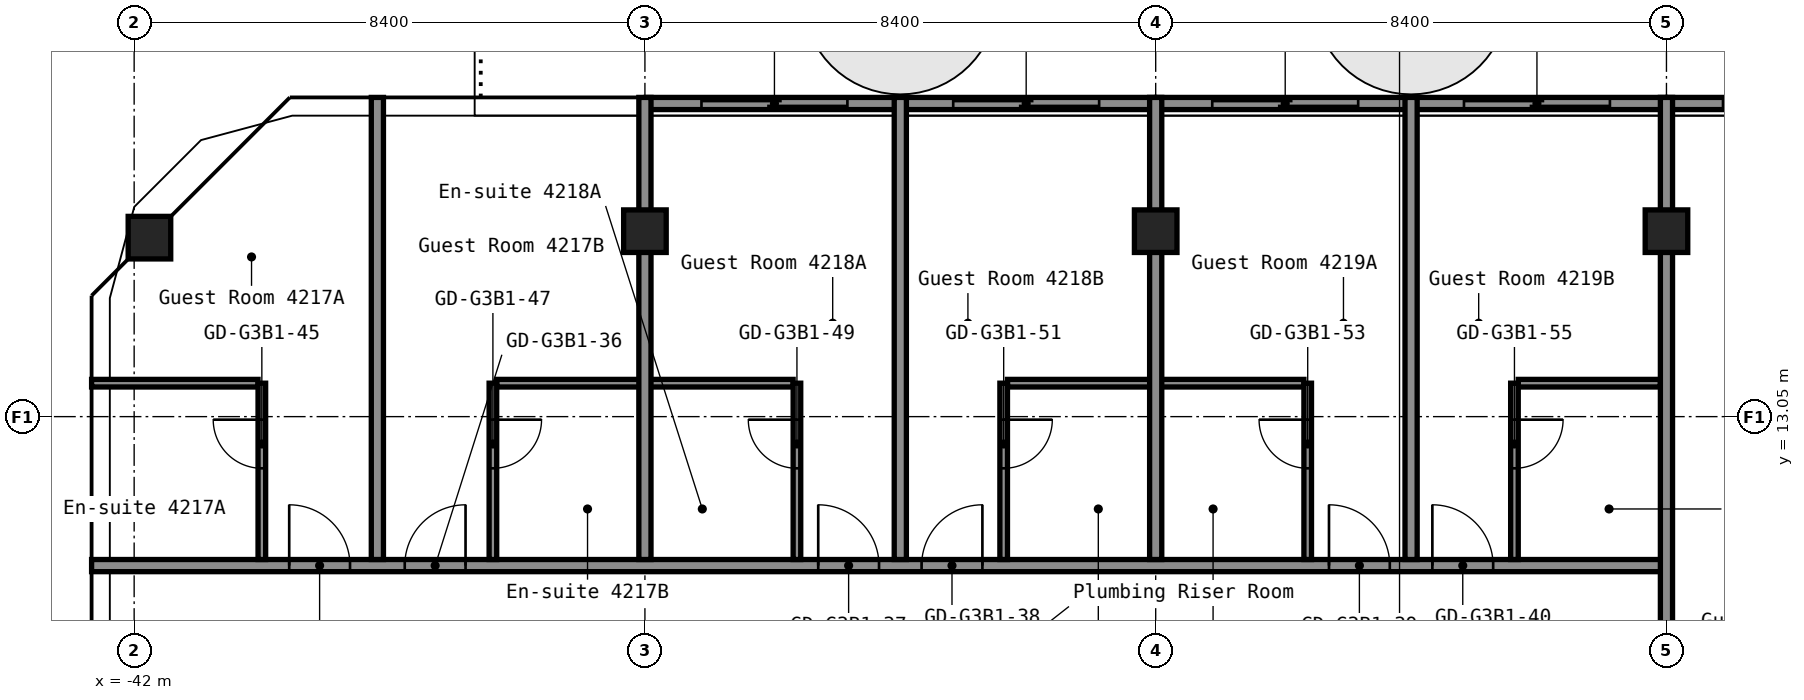
"""IFC4 building model, lengths in metres.
Left out: names, types, materials, properties, quantities, classifications, styles, units other than length and angle.
Written with IfcOpenShell. Run it as: python <this file> out.ifc"""

import sys

from ifc_helpers import new_model, si_unit, direction, frame, frame_2d, origin, origin_2d, place, context, subcontext, project, spatial, rectangle, hollow_rectangle, extrude, element, fill, save


model = new_model("IFC4")
c1 = context("Model", 3, precision=1e-05, world=origin(), true_north=direction((0.0, 1.0)))
c2 = subcontext(c1, "Body", "Model", "MODEL_VIEW")
j1 = project(units=[si_unit("LENGTHUNIT", "METRE"), si_unit("PLANEANGLEUNIT", "RADIAN")], contexts=[c1])
p1 = place(None, origin())
s1 = spatial("IfcSite", under=j1, at=p1, CompositionType="ELEMENT")
p2 = place(p1, origin())
s2 = spatial("IfcBuilding", under=s1, at=p2, CompositionType="ELEMENT")
p3 = place(p2, frame((0.0, 0.0, 150.2)))
s3 = spatial("IfcBuildingStorey", under=s2, at=p3, CompositionType="ELEMENT", Elevation=150.2)
for number, where, z_axis, x_axis in (
    (1, (-41.749, 15.994, 0.0), (0.0, 0.0, 1.0), (1.0, 0.0, 0.0)),
    (2, (-33.6, 16.1, 0.0), (0.0, 0.0, 1.0), (1.0, 0.0, 0.0)),
    (3, (-25.2, 16.1, 0.0), (0.0, 0.0, 1.0), (1.0, 0.0, 0.0)),
    (4, (-16.8, 16.1, 0.0), (0.0, 0.0, 1.0), (1.0, 0.0, 0.0)),
):
    element("IfcColumn", number, at=place(p3, frame(where, z_axis=z_axis, x_axis=x_axis)), inside=s3, PredefinedType="COLUMN", context=c2, shape_type="SweptSolid", body=[
        extrude(hollow_rectangle(XDim=0.7, YDim=0.7, WallThickness=0.028, at=origin_2d()), origin(), (0.0, 0.0, 1.0), 2.75),
    ])
p4 = place(p3, frame((-42.7, 10.6, 0.0), z_axis=(0.0, 0.0, 1.0), x_axis=(1.0, 0.0, 0.0)))
e5 = element("IfcWall", 5, at=p4, inside=s3, PredefinedType="PARTITIONING", context=c2, shape_type="SweptSolid", body=[
    extrude(rectangle(XDim=25.9, YDim=0.2, at=frame_2d((12.95, 0.0))), origin(), (0.0, 0.0, 1.0), 2.75),
])
p5 = place(p4, frame((3.25, 0.0, 0.0)))
e6 = element("IfcOpeningElement", 6, at=p5, cuts=e5, PredefinedType="OPENING", context=c2, shape_type="SweptSolid", body=[
    extrude(rectangle(XDim=1.0, YDim=2.1, at=frame_2d((0.5, 1.05))), frame((0.0, 0.11, 0.0), z_axis=(0.0, -1.0, 0.0), x_axis=(1.0, 0.0, 0.0)), (0.0, 0.0, 1.0), 0.22),
])
p6 = place(p4, frame((5.15, 0.0, 0.0)))
e7 = element("IfcOpeningElement", 7, at=p6, cuts=e5, PredefinedType="OPENING", context=c2, shape_type="SweptSolid", body=[
    extrude(rectangle(XDim=1.0, YDim=2.1, at=frame_2d((0.5, 1.05))), frame((0.0, 0.11, 0.0), z_axis=(0.0, -1.0, 0.0), x_axis=(1.0, 0.0, 0.0)), (0.0, 0.0, 1.0), 0.22),
])
p7 = place(p4, frame((11.95, 0.0, 0.0)))
e8 = element("IfcOpeningElement", 8, at=p7, cuts=e5, PredefinedType="OPENING", context=c2, shape_type="SweptSolid", body=[
    extrude(rectangle(XDim=1.0, YDim=2.1, at=frame_2d((0.5, 1.05))), frame((0.0, 0.11, 0.0), z_axis=(0.0, -1.0, 0.0), x_axis=(1.0, 0.0, 0.0)), (0.0, 0.0, 1.0), 0.22),
])
p8 = place(p4, frame((13.65, 0.0, 0.0)))
e9 = element("IfcOpeningElement", 9, at=p8, cuts=e5, PredefinedType="OPENING", context=c2, shape_type="SweptSolid", body=[
    extrude(rectangle(XDim=1.0, YDim=2.1, at=frame_2d((0.5, 1.05))), frame((0.0, 0.11, 0.0), z_axis=(0.0, -1.0, 0.0), x_axis=(1.0, 0.0, 0.0)), (0.0, 0.0, 1.0), 0.22),
])
p9 = place(p4, frame((20.35, 0.0, 0.0)))
e10 = element("IfcOpeningElement", 10, at=p9, cuts=e5, PredefinedType="OPENING", context=c2, shape_type="SweptSolid", body=[
    extrude(rectangle(XDim=1.0, YDim=2.1, at=frame_2d((0.5, 1.05))), frame((0.0, 0.11, 0.0), z_axis=(0.0, -1.0, 0.0), x_axis=(1.0, 0.0, 0.0)), (0.0, 0.0, 1.0), 0.22),
])
p10 = place(p4, frame((22.05, 0.0, 0.0)))
e11 = element("IfcOpeningElement", 11, at=p10, cuts=e5, PredefinedType="OPENING", context=c2, shape_type="SweptSolid", body=[
    extrude(rectangle(XDim=1.0, YDim=2.1, at=frame_2d((0.5, 1.05))), frame((0.0, 0.11, 0.0), z_axis=(0.0, -1.0, 0.0), x_axis=(1.0, 0.0, 0.0)), (0.0, 0.0, 1.0), 0.22),
])
p11 = place(p3, frame((-42.7, 13.6, 0.0), z_axis=(0.0, 0.0, 1.0), x_axis=(1.0, 0.0, 0.0)))
e12 = element("IfcWall", 12, at=p11, inside=s3, PredefinedType="PARTITIONING", context=c2, shape_type="SweptSolid", body=[
    extrude(rectangle(XDim=2.738, YDim=0.125, at=frame_2d((1.369, 0.0))), origin(), (0.0, 0.0, 1.0), 2.75),
])
for number, where, z_axis, x_axis in (
    (13, (-36.038, 13.6, 0.0), (0.0, 0.0, 1.0), (1.0, 0.0, 0.0)),
    (14, (-27.637, 13.6, 0.0), (0.0, 0.0, 1.0), (1.0, 0.0, 0.0)),
):
    element("IfcWall", number, at=place(p3, frame(where, z_axis=z_axis, x_axis=x_axis)), inside=s3, PredefinedType="PARTITIONING", context=c2, shape_type="SweptSolid", body=[
        extrude(rectangle(XDim=4.875, YDim=0.125, at=frame_2d((2.438, 0.0))), origin(), (0.0, 0.0, 1.0), 2.75),
    ])
p12 = place(p3, frame((-19.238, 13.6, 0.0), z_axis=(0.0, 0.0, 1.0), x_axis=(1.0, 0.0, 0.0)))
e15 = element("IfcWall", 15, at=p12, inside=s3, PredefinedType="PARTITIONING", context=c2, shape_type="SweptSolid", body=[
    extrude(rectangle(XDim=2.338, YDim=0.125, at=frame_2d((1.169, 0.0))), origin(), (0.0, 0.0, 1.0), 2.75),
])
p13 = place(p3, frame((-39.9, 10.7, 0.0), z_axis=(0.0, 0.0, 1.0), x_axis=(0.0, 1.0, 0.0)))
e16 = element("IfcWall", 16, at=p13, inside=s3, PredefinedType="PARTITIONING", context=c2, shape_type="SweptSolid", body=[
    extrude(rectangle(XDim=2.9, YDim=0.125, at=frame_2d((1.45, 0.0))), origin(), (0.0, 0.0, 1.0), 2.75),
])
p14 = place(p13, frame((1.5, 0.0, 0.0)))
e17 = element("IfcOpeningElement", 17, at=p14, cuts=e16, PredefinedType="OPENING", context=c2, shape_type="SweptSolid", body=[
    extrude(rectangle(XDim=0.8, YDim=2.1, at=frame_2d((0.4, 1.05))), frame((0.0, 0.073, 0.0), z_axis=(0.0, -1.0, 0.0), x_axis=(1.0, 0.0, 0.0)), (0.0, 0.0, 1.0), 0.145),
])
p15 = place(p3, frame((-38.0, 10.7, 0.0), z_axis=(0.0, 0.0, 1.0), x_axis=(0.0, 1.0, 0.0)))
e18 = element("IfcWall", 18, at=p15, inside=s3, PredefinedType="PARTITIONING", context=c2, shape_type="SweptSolid", body=[
    extrude(rectangle(XDim=7.6, YDim=0.2, at=frame_2d((3.8, 0.0))), origin(), (0.0, 0.0, 1.0), 2.75),
])
p16 = place(p3, frame((-36.1, 10.7, 0.0), z_axis=(0.0, 0.0, 1.0), x_axis=(0.0, 1.0, 0.0)))
e19 = element("IfcWall", 19, at=p16, inside=s3, PredefinedType="PARTITIONING", context=c2, shape_type="SweptSolid", body=[
    extrude(rectangle(XDim=2.9, YDim=0.125, at=frame_2d((1.45, 0.0))), origin(), (0.0, 0.0, 1.0), 2.75),
])
p17 = place(p16, frame((1.5, 0.0, 0.0)))
e20 = element("IfcOpeningElement", 20, at=p17, cuts=e19, PredefinedType="OPENING", context=c2, shape_type="SweptSolid", body=[
    extrude(rectangle(XDim=0.8, YDim=2.1, at=frame_2d((0.4, 1.05))), frame((0.0, 0.073, 0.0), z_axis=(0.0, -1.0, 0.0), x_axis=(1.0, 0.0, 0.0)), (0.0, 0.0, 1.0), 0.145),
])
p18 = place(p3, frame((-33.6, 10.7, 0.0), z_axis=(0.0, 0.0, 1.0), x_axis=(0.0, 1.0, 0.0)))
e21 = element("IfcWall", 21, at=p18, inside=s3, PredefinedType="PARTITIONING", context=c2, shape_type="SweptSolid", body=[
    extrude(rectangle(XDim=7.6, YDim=0.2, at=frame_2d((3.8, 0.0))), origin(), (0.0, 0.0, 1.0), 2.75),
])
p19 = place(p3, frame((-31.1, 10.7, 0.0), z_axis=(0.0, 0.0, 1.0), x_axis=(0.0, 1.0, 0.0)))
e22 = element("IfcWall", 22, at=p19, inside=s3, PredefinedType="PARTITIONING", context=c2, shape_type="SweptSolid", body=[
    extrude(rectangle(XDim=2.9, YDim=0.125, at=frame_2d((1.45, 0.0))), origin(), (0.0, 0.0, 1.0), 2.75),
])
p20 = place(p19, frame((1.5, 0.0, 0.0)))
e23 = element("IfcOpeningElement", 23, at=p20, cuts=e22, PredefinedType="OPENING", context=c2, shape_type="SweptSolid", body=[
    extrude(rectangle(XDim=0.8, YDim=2.1, at=frame_2d((0.4, 1.05))), frame((0.0, 0.073, 0.0), z_axis=(0.0, -1.0, 0.0), x_axis=(1.0, 0.0, 0.0)), (0.0, 0.0, 1.0), 0.145),
])
p21 = place(p3, frame((-29.4, 10.7, 0.0), z_axis=(0.0, 0.0, 1.0), x_axis=(0.0, 1.0, 0.0)))
e24 = element("IfcWall", 24, at=p21, inside=s3, PredefinedType="PARTITIONING", context=c2, shape_type="SweptSolid", body=[
    extrude(rectangle(XDim=7.6, YDim=0.2, at=frame_2d((3.8, 0.0))), origin(), (0.0, 0.0, 1.0), 2.75),
])
p22 = place(p3, frame((-27.7, 10.7, 0.0), z_axis=(0.0, 0.0, 1.0), x_axis=(0.0, 1.0, 0.0)))
e25 = element("IfcWall", 25, at=p22, inside=s3, PredefinedType="PARTITIONING", context=c2, shape_type="SweptSolid", body=[
    extrude(rectangle(XDim=2.9, YDim=0.125, at=frame_2d((1.45, 0.0))), origin(), (0.0, 0.0, 1.0), 2.75),
])
p23 = place(p22, frame((1.5, 0.0, 0.0)))
e26 = element("IfcOpeningElement", 26, at=p23, cuts=e25, PredefinedType="OPENING", context=c2, shape_type="SweptSolid", body=[
    extrude(rectangle(XDim=0.8, YDim=2.1, at=frame_2d((0.4, 1.05))), frame((0.0, 0.073, 0.0), z_axis=(0.0, -1.0, 0.0), x_axis=(1.0, 0.0, 0.0)), (0.0, 0.0, 1.0), 0.145),
])
p24 = place(p3, frame((-25.2, 10.7, 0.0), z_axis=(0.0, 0.0, 1.0), x_axis=(0.0, 1.0, 0.0)))
e27 = element("IfcWall", 27, at=p24, inside=s3, PredefinedType="PARTITIONING", context=c2, shape_type="SweptSolid", body=[
    extrude(rectangle(XDim=7.6, YDim=0.2, at=frame_2d((3.8, 0.0))), origin(), (0.0, 0.0, 1.0), 2.75),
])
p25 = place(p3, frame((-22.7, 10.7, 0.0), z_axis=(0.0, 0.0, 1.0), x_axis=(0.0, 1.0, 0.0)))
e28 = element("IfcWall", 28, at=p25, inside=s3, PredefinedType="PARTITIONING", context=c2, shape_type="SweptSolid", body=[
    extrude(rectangle(XDim=2.9, YDim=0.125, at=frame_2d((1.45, 0.0))), origin(), (0.0, 0.0, 1.0), 2.75),
])
p26 = place(p25, frame((1.5, 0.0, 0.0)))
e29 = element("IfcOpeningElement", 29, at=p26, cuts=e28, PredefinedType="OPENING", context=c2, shape_type="SweptSolid", body=[
    extrude(rectangle(XDim=0.8, YDim=2.1, at=frame_2d((0.4, 1.05))), frame((0.0, 0.073, 0.0), z_axis=(0.0, -1.0, 0.0), x_axis=(1.0, 0.0, 0.0)), (0.0, 0.0, 1.0), 0.145),
])
p27 = place(p3, frame((-21.0, 10.7, 0.0), z_axis=(0.0, 0.0, 1.0), x_axis=(0.0, 1.0, 0.0)))
e30 = element("IfcWall", 30, at=p27, inside=s3, PredefinedType="PARTITIONING", context=c2, shape_type="SweptSolid", body=[
    extrude(rectangle(XDim=7.6, YDim=0.2, at=frame_2d((3.8, 0.0))), origin(), (0.0, 0.0, 1.0), 2.75),
])
p28 = place(p3, frame((-19.3, 10.7, 0.0), z_axis=(0.0, 0.0, 1.0), x_axis=(0.0, 1.0, 0.0)))
e31 = element("IfcWall", 31, at=p28, inside=s3, PredefinedType="PARTITIONING", context=c2, shape_type="SweptSolid", body=[
    extrude(rectangle(XDim=2.9, YDim=0.125, at=frame_2d((1.45, 0.0))), origin(), (0.0, 0.0, 1.0), 2.75),
])
p29 = place(p28, frame((1.5, 0.0, 0.0)))
e32 = element("IfcOpeningElement", 32, at=p29, cuts=e31, PredefinedType="OPENING", context=c2, shape_type="SweptSolid", body=[
    extrude(rectangle(XDim=0.8, YDim=2.1, at=frame_2d((0.4, 1.05))), frame((0.0, 0.073, 0.0), z_axis=(0.0, -1.0, 0.0), x_axis=(1.0, 0.0, 0.0)), (0.0, 0.0, 1.0), 0.145),
])
p30 = place(p3, frame((-16.8, 8.39, 0.0), z_axis=(0.0, 0.0, 1.0), x_axis=(0.0, 1.0, 0.0)))
e33 = element("IfcWall", 33, at=p30, inside=s3, PredefinedType="PARTITIONING", context=c2, shape_type="SweptSolid", body=[
    extrude(rectangle(XDim=9.91, YDim=0.2, at=frame_2d((4.955, 0.0))), origin(), (0.0, 0.0, 1.0), 2.75),
])
p31 = place(p3, frame((-12.56, 18.2, 0.0), z_axis=(0.0, 0.0, 1.0), x_axis=(-1.0, 0.0, 0.0)))
p32 = place(p31, frame((0.91, 0.0, 0.0)))
p33 = place(p32, frame((2.4, 0.0, 0.0), z_axis=(0.0, 0.0, 1.0), x_axis=(-1.0, 0.0, 0.0)))
e34 = element("IfcDoor", 34, at=p33, inside=s3, OperationType="SLIDING_TO_LEFT", PredefinedType="DOOR", context=c2, shape_type="SweptSolid", body=[
    extrude(rectangle(XDim=2.4, YDim=2.2, at=frame_2d((1.2, 1.1))), frame((0.0, 0.025, 0.0), z_axis=(0.0, -1.0, 0.0), x_axis=(1.0, 0.0, 0.0)), (0.0, 0.0, 1.0), 0.05),
])
p34 = place(p3, frame((-16.82, 18.2, 0.0), z_axis=(0.0, 0.0, 1.0), x_axis=(-1.0, 0.0, 0.0)))
p35 = place(p34, frame((0.91, 0.0, 0.0)))
p36 = place(p35, frame((2.4, 0.0, 0.0), z_axis=(0.0, 0.0, 1.0), x_axis=(-1.0, 0.0, 0.0)))
e35 = element("IfcDoor", 35, at=p36, inside=s3, OperationType="SLIDING_TO_LEFT", PredefinedType="DOOR", context=c2, shape_type="SweptSolid", body=[
    extrude(rectangle(XDim=2.4, YDim=2.2, at=frame_2d((1.2, 1.1))), frame((0.0, 0.025, 0.0), z_axis=(0.0, -1.0, 0.0), x_axis=(1.0, 0.0, 0.0)), (0.0, 0.0, 1.0), 0.05),
])
p37 = place(p3, frame((-20.96, 18.2, 0.0), z_axis=(0.0, 0.0, 1.0), x_axis=(-1.0, 0.0, 0.0)))
p38 = place(p37, frame((0.91, 0.0, 0.0)))
p39 = place(p38, frame((2.4, 0.0, 0.0), z_axis=(0.0, 0.0, 1.0), x_axis=(-1.0, 0.0, 0.0)))
e36 = element("IfcDoor", 36, at=p39, inside=s3, OperationType="SLIDING_TO_LEFT", PredefinedType="DOOR", context=c2, shape_type="SweptSolid", body=[
    extrude(rectangle(XDim=2.4, YDim=2.2, at=frame_2d((1.2, 1.1))), frame((0.0, 0.025, 0.0), z_axis=(0.0, -1.0, 0.0), x_axis=(1.0, 0.0, 0.0)), (0.0, 0.0, 1.0), 0.05),
])
p40 = place(p3, frame((-25.22, 18.2, 0.0), z_axis=(0.0, 0.0, 1.0), x_axis=(-1.0, 0.0, 0.0)))
p41 = place(p40, frame((0.91, 0.0, 0.0)))
p42 = place(p41, frame((2.4, 0.0, 0.0), z_axis=(0.0, 0.0, 1.0), x_axis=(-1.0, 0.0, 0.0)))
e37 = element("IfcDoor", 37, at=p42, inside=s3, OperationType="SLIDING_TO_LEFT", PredefinedType="DOOR", context=c2, shape_type="SweptSolid", body=[
    extrude(rectangle(XDim=2.4, YDim=2.2, at=frame_2d((1.2, 1.1))), frame((0.0, 0.025, 0.0), z_axis=(0.0, -1.0, 0.0), x_axis=(1.0, 0.0, 0.0)), (0.0, 0.0, 1.0), 0.05),
])
p43 = place(p3, frame((-29.36, 18.2, 0.0), z_axis=(0.0, 0.0, 1.0), x_axis=(-1.0, 0.0, 0.0)))
p44 = place(p43, frame((0.91, 0.0, 0.0)))
p45 = place(p44, frame((2.4, 0.0, 0.0), z_axis=(0.0, 0.0, 1.0), x_axis=(-1.0, 0.0, 0.0)))
e38 = element("IfcDoor", 38, at=p45, inside=s3, OperationType="SLIDING_TO_LEFT", PredefinedType="DOOR", context=c2, shape_type="SweptSolid", body=[
    extrude(rectangle(XDim=2.4, YDim=2.2, at=frame_2d((1.2, 1.1))), frame((0.0, 0.025, 0.0), z_axis=(0.0, -1.0, 0.0), x_axis=(1.0, 0.0, 0.0)), (0.0, 0.0, 1.0), 0.05),
])
p46 = place(p5, origin())
e39 = element("IfcDoor", 39, at=p46, inside=s3, OperationType="SINGLE_SWING_RIGHT", PredefinedType="DOOR", context=c2, shape_type="SweptSolid", body=[
    extrude(rectangle(XDim=1.0, YDim=2.1, at=frame_2d((0.5, 1.05))), frame((0.0, 0.025, 0.0), z_axis=(0.0, -1.0, 0.0), x_axis=(1.0, 0.0, 0.0)), (0.0, 0.0, 1.0), 0.05),
])
fill(e6, e39)
p47 = place(p6, origin())
e40 = element("IfcDoor", 40, at=p47, inside=s3, OperationType="SINGLE_SWING_LEFT", PredefinedType="DOOR", context=c2, shape_type="SweptSolid", body=[
    extrude(rectangle(XDim=1.0, YDim=2.1, at=frame_2d((0.5, 1.05))), frame((0.0, 0.025, 0.0), z_axis=(0.0, -1.0, 0.0), x_axis=(1.0, 0.0, 0.0)), (0.0, 0.0, 1.0), 0.05),
])
fill(e7, e40)
p48 = place(p7, origin())
e41 = element("IfcDoor", 41, at=p48, inside=s3, OperationType="SINGLE_SWING_RIGHT", PredefinedType="DOOR", context=c2, shape_type="SweptSolid", body=[
    extrude(rectangle(XDim=1.0, YDim=2.1, at=frame_2d((0.5, 1.05))), frame((0.0, 0.025, 0.0), z_axis=(0.0, -1.0, 0.0), x_axis=(1.0, 0.0, 0.0)), (0.0, 0.0, 1.0), 0.05),
])
fill(e8, e41)
p49 = place(p8, origin())
e42 = element("IfcDoor", 42, at=p49, inside=s3, OperationType="SINGLE_SWING_LEFT", PredefinedType="DOOR", context=c2, shape_type="SweptSolid", body=[
    extrude(rectangle(XDim=1.0, YDim=2.1, at=frame_2d((0.5, 1.05))), frame((0.0, 0.025, 0.0), z_axis=(0.0, -1.0, 0.0), x_axis=(1.0, 0.0, 0.0)), (0.0, 0.0, 1.0), 0.05),
])
fill(e9, e42)
p50 = place(p9, origin())
e43 = element("IfcDoor", 43, at=p50, inside=s3, OperationType="SINGLE_SWING_RIGHT", PredefinedType="DOOR", context=c2, shape_type="SweptSolid", body=[
    extrude(rectangle(XDim=1.0, YDim=2.1, at=frame_2d((0.5, 1.05))), frame((0.0, 0.025, 0.0), z_axis=(0.0, -1.0, 0.0), x_axis=(1.0, 0.0, 0.0)), (0.0, 0.0, 1.0), 0.05),
])
fill(e10, e43)
p51 = place(p10, origin())
e44 = element("IfcDoor", 44, at=p51, inside=s3, OperationType="SINGLE_SWING_RIGHT", PredefinedType="DOOR", context=c2, shape_type="SweptSolid", body=[
    extrude(rectangle(XDim=1.0, YDim=2.1, at=frame_2d((0.5, 1.05))), frame((0.0, 0.025, 0.0), z_axis=(0.0, -1.0, 0.0), x_axis=(1.0, 0.0, 0.0)), (0.0, 0.0, 1.0), 0.05),
])
fill(e11, e44)
p52 = place(p14, origin())
e45 = element("IfcDoor", 45, at=p52, inside=s3, OperationType="SINGLE_SWING_LEFT", PredefinedType="DOOR", context=c2, shape_type="SweptSolid", body=[
    extrude(rectangle(XDim=0.8, YDim=2.1, at=frame_2d((0.4, 1.05))), frame((0.0, 0.025, 0.0), z_axis=(0.0, -1.0, 0.0), x_axis=(1.0, 0.0, 0.0)), (0.0, 0.0, 1.0), 0.05),
])
fill(e17, e45)
p53 = place(p17, origin())
e46 = element("IfcDoor", 46, at=p53, inside=s3, OperationType="SINGLE_SWING_RIGHT", PredefinedType="DOOR", context=c2, shape_type="SweptSolid", body=[
    extrude(rectangle(XDim=0.8, YDim=2.1, at=frame_2d((0.4, 1.05))), frame((0.0, 0.025, 0.0), z_axis=(0.0, -1.0, 0.0), x_axis=(1.0, 0.0, 0.0)), (0.0, 0.0, 1.0), 0.05),
])
fill(e20, e46)
p54 = place(p20, origin())
e47 = element("IfcDoor", 47, at=p54, inside=s3, OperationType="SINGLE_SWING_LEFT", PredefinedType="DOOR", context=c2, shape_type="SweptSolid", body=[
    extrude(rectangle(XDim=0.8, YDim=2.1, at=frame_2d((0.4, 1.05))), frame((0.0, 0.025, 0.0), z_axis=(0.0, -1.0, 0.0), x_axis=(1.0, 0.0, 0.0)), (0.0, 0.0, 1.0), 0.05),
])
fill(e23, e47)
p55 = place(p23, origin())
e48 = element("IfcDoor", 48, at=p55, inside=s3, OperationType="SINGLE_SWING_RIGHT", PredefinedType="DOOR", context=c2, shape_type="SweptSolid", body=[
    extrude(rectangle(XDim=0.8, YDim=2.1, at=frame_2d((0.4, 1.05))), frame((0.0, 0.025, 0.0), z_axis=(0.0, -1.0, 0.0), x_axis=(1.0, 0.0, 0.0)), (0.0, 0.0, 1.0), 0.05),
])
fill(e26, e48)
p56 = place(p26, origin())
e49 = element("IfcDoor", 49, at=p56, inside=s3, OperationType="SINGLE_SWING_LEFT", PredefinedType="DOOR", context=c2, shape_type="SweptSolid", body=[
    extrude(rectangle(XDim=0.8, YDim=2.1, at=frame_2d((0.4, 1.05))), frame((0.0, 0.025, 0.0), z_axis=(0.0, -1.0, 0.0), x_axis=(1.0, 0.0, 0.0)), (0.0, 0.0, 1.0), 0.05),
])
fill(e29, e49)
p57 = place(p29, origin())
e50 = element("IfcDoor", 50, at=p57, inside=s3, OperationType="SINGLE_SWING_RIGHT", PredefinedType="DOOR", context=c2, shape_type="SweptSolid", body=[
    extrude(rectangle(XDim=0.8, YDim=2.1, at=frame_2d((0.4, 1.05))), frame((0.0, 0.025, 0.0), z_axis=(0.0, -1.0, 0.0), x_axis=(1.0, 0.0, 0.0)), (0.0, 0.0, 1.0), 0.05),
])
fill(e32, e50)
save(model, sys.argv[1])
